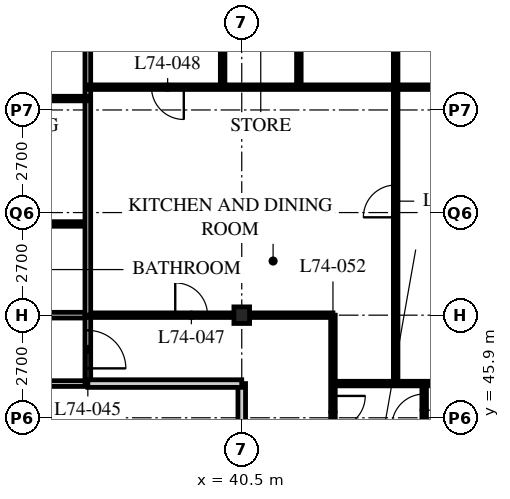
"""IFC4 building model, lengths in metres.
Left out: names, types, materials, properties, quantities, classifications, styles, units other than length and angle.
Written with IfcOpenShell. Run it as: python <this file> out.ifc"""

import sys

from ifc_helpers import new_model, si_unit, direction, frame, frame_2d, origin, origin_2d, place, context, subcontext, project, spatial, rectangle, i_section, extrude, element, fill, save


model = new_model("IFC4")
c1 = context("Model", 3, precision=1e-05, world=origin(), true_north=direction((0.0, 1.0)))
c2 = subcontext(c1, "Body", "Model", "MODEL_VIEW")
j1 = project(units=[si_unit("LENGTHUNIT", "METRE"), si_unit("PLANEANGLEUNIT", "RADIAN")], contexts=[c1])
p1 = place(None, origin())
s1 = spatial("IfcSite", under=j1, at=p1, CompositionType="ELEMENT")
p2 = place(p1, origin())
s2 = spatial("IfcBuilding", under=s1, at=p2, CompositionType="ELEMENT")
p3 = place(p2, frame((0.0, 0.0, 289.2)))
s3 = spatial("IfcBuildingStorey", under=s2, at=p3, CompositionType="ELEMENT", Elevation=289.2)
p4 = place(p3, frame((40.5, 48.6, 0.0), z_axis=(0.0, 0.0, 1.0), x_axis=(1.0, 0.0, 0.0)))
e1 = element("IfcColumn", 1, at=p4, inside=s3, PredefinedType="COLUMN", context=c2, shape_type="SweptSolid", body=[
    extrude(i_section(OverallWidth=0.412, OverallDepth=0.437, WebThickness=0.036, FlangeThickness=0.058, FilletRadius=0.015, at=origin_2d()), origin(), (0.0, 0.0, 1.0), 3.9),
])
p5 = place(p3, frame((12.15, 48.6, 0.0), z_axis=(0.0, 0.0, 1.0), x_axis=(1.0, 0.0, 0.0)))
e2 = element("IfcWall", 2, at=p5, inside=s3, PredefinedType="PARTITIONING", context=c2, shape_type="SweptSolid", body=[
    extrude(rectangle(XDim=24.3, YDim=0.15, at=frame_2d((12.15, 0.0))), origin(), (0.0, 0.0, 1.0), 3.078),
])
p6 = place(p5, frame((4.95, 0.0, 0.0)))
e3 = element("IfcOpeningElement", 3, at=p6, cuts=e2, PredefinedType="OPENING", context=c2, shape_type="SweptSolid", body=[
    extrude(rectangle(XDim=1.0, YDim=2.1, at=frame_2d((0.5, 1.05))), frame((0.0, 0.085, 0.0), z_axis=(0.0, -1.0, 0.0), x_axis=(1.0, 0.0, 0.0)), (0.0, 0.0, 1.0), 0.17),
])
p7 = place(p5, frame((16.6, 0.0, 0.0)))
e4 = element("IfcOpeningElement", 4, at=p7, cuts=e2, PredefinedType="OPENING", context=c2, shape_type="SweptSolid", body=[
    extrude(rectangle(XDim=1.0, YDim=2.1, at=frame_2d((0.5, 1.05))), frame((0.0, 0.085, 0.0), z_axis=(0.0, -1.0, 0.0), x_axis=(1.0, 0.0, 0.0)), (0.0, 0.0, 1.0), 0.17),
])
p8 = place(p5, frame((1.525, 0.0, 0.0)))
e5 = element("IfcOpeningElement", 5, at=p8, cuts=e2, PredefinedType="OPENING", context=c2, shape_type="SweptSolid", body=[
    extrude(rectangle(XDim=1.0, YDim=2.1, at=frame_2d((0.5, 1.05))), frame((0.0, 0.085, 0.0), z_axis=(0.0, -1.0, 0.0), x_axis=(1.0, 0.0, 0.0)), (0.0, 0.0, 1.0), 0.17),
])
p9 = place(p3, frame((29.56, 46.8, 0.0), z_axis=(0.0, 0.0, 1.0), x_axis=(1.0, 0.0, 0.0)))
e6 = element("IfcWall", 6, at=p9, inside=s3, PredefinedType="PARTITIONING", context=c2, shape_type="SweptSolid", body=[
    extrude(rectangle(XDim=6.89, YDim=0.15, at=frame_2d((3.445, 0.0))), origin(), (0.0, 0.0, 1.0), 3.69),
])
p10 = place(p9, frame((2.69, 0.0, 0.0)))
e7 = element("IfcOpeningElement", 7, at=p10, cuts=e6, PredefinedType="OPENING", context=c2, shape_type="SweptSolid", body=[
    extrude(rectangle(XDim=1.0, YDim=2.1, at=frame_2d((0.5, 1.05))), frame((0.0, 0.085, 0.0), z_axis=(0.0, -1.0, 0.0), x_axis=(1.0, 0.0, 0.0)), (0.0, 0.0, 1.0), 0.17),
])
p11 = place(p3, frame((36.45, 46.8, 0.0), z_axis=(0.0, 0.0, 1.0), x_axis=(0.0, 1.0, 0.0)))
e8 = element("IfcWall", 8, at=p11, inside=s3, PredefinedType="PARTITIONING", context=c2, shape_type="SweptSolid", body=[
    extrude(rectangle(XDim=1.8, YDim=0.15, at=frame_2d((0.9, 0.0))), origin(), (0.0, 0.0, 1.0), 3.69),
])
p12 = place(p11, frame((0.4, 0.0, 0.0)))
e9 = element("IfcOpeningElement", 9, at=p12, cuts=e8, PredefinedType="OPENING", context=c2, shape_type="SweptSolid", body=[
    extrude(rectangle(XDim=1.0, YDim=2.1, at=frame_2d((0.5, 1.05))), frame((0.0, 0.085, 0.0), z_axis=(0.0, -1.0, 0.0), x_axis=(1.0, 0.0, 0.0)), (0.0, 0.0, 1.0), 0.17),
])
p13 = place(p3, frame((40.5, 40.5, 0.0), z_axis=(0.0, 0.0, 1.0), x_axis=(0.0, 1.0, 0.0)))
e10 = element("IfcWall", 10, at=p13, inside=s3, PredefinedType="SOLIDWALL", context=c2, shape_type="SweptSolid", body=[
    extrude(rectangle(XDim=6.3, YDim=0.2, at=frame_2d((3.15, 0.0))), origin(), (0.0, 0.0, 1.0), 3.078),
])
p14 = place(p3, frame((8.15, 51.0, 0.0), z_axis=(0.0, 0.0, 1.0), x_axis=(1.0, 0.0, 0.0)))
e11 = element("IfcWall", 11, at=p14, inside=s3, PredefinedType="PARTITIONING", context=c2, shape_type="SweptSolid", body=[
    extrude(rectangle(XDim=28.3, YDim=0.12, at=frame_2d((14.15, 0.0))), origin(), (0.0, 0.0, 1.0), 3.69),
])
p15 = place(p14, frame((9.025, 0.0, 0.0)))
e12 = element("IfcOpeningElement", 12, at=p15, cuts=e11, PredefinedType="OPENING", context=c2, shape_type="SweptSolid", body=[
    extrude(rectangle(XDim=0.85, YDim=2.1, at=frame_2d((0.425, 1.05))), frame((0.0, 0.07, 0.0), z_axis=(0.0, -1.0, 0.0), x_axis=(1.0, 0.0, 0.0)), (0.0, 0.0, 1.0), 0.14),
])
p16 = place(p14, frame((16.475, 0.0, 0.0)))
e13 = element("IfcOpeningElement", 13, at=p16, cuts=e11, PredefinedType="OPENING", context=c2, shape_type="SweptSolid", body=[
    extrude(rectangle(XDim=0.85, YDim=2.1, at=frame_2d((0.425, 1.05))), frame((0.0, 0.07, 0.0), z_axis=(0.0, -1.0, 0.0), x_axis=(1.0, 0.0, 0.0)), (0.0, 0.0, 1.0), 0.14),
])
p17 = place(p14, frame((21.175, 0.0, 0.0)))
e14 = element("IfcOpeningElement", 14, at=p17, cuts=e11, PredefinedType="OPENING", context=c2, shape_type="SweptSolid", body=[
    extrude(rectangle(XDim=0.85, YDim=2.1, at=frame_2d((0.425, 1.05))), frame((0.0, 0.07, 0.0), z_axis=(0.0, -1.0, 0.0), x_axis=(1.0, 0.0, 0.0)), (0.0, 0.0, 1.0), 0.14),
])
p18 = place(p14, frame((24.575, 0.0, 0.0)))
e15 = element("IfcOpeningElement", 15, at=p18, cuts=e11, PredefinedType="OPENING", context=c2, shape_type="SweptSolid", body=[
    extrude(rectangle(XDim=0.85, YDim=2.1, at=frame_2d((0.425, 1.05))), frame((0.0, 0.07, 0.0), z_axis=(0.0, -1.0, 0.0), x_axis=(1.0, 0.0, 0.0)), (0.0, 0.0, 1.0), 0.14),
])
p19 = place(p14, frame((6.725, 0.0, 0.0)))
e16 = element("IfcOpeningElement", 16, at=p19, cuts=e11, PredefinedType="OPENING", context=c2, shape_type="SweptSolid", body=[
    extrude(rectangle(XDim=0.85, YDim=2.1, at=frame_2d((0.425, 1.05))), frame((0.0, 0.07, 0.0), z_axis=(0.0, -1.0, 0.0), x_axis=(1.0, 0.0, 0.0)), (0.0, 0.0, 1.0), 0.14),
])
p20 = place(p14, frame((2.875, 0.0, 0.0)))
e17 = element("IfcOpeningElement", 17, at=p20, cuts=e11, PredefinedType="OPENING", context=c2, shape_type="SweptSolid", body=[
    extrude(rectangle(XDim=0.85, YDim=2.1, at=frame_2d((0.425, 1.05))), frame((0.0, 0.07, 0.0), z_axis=(0.0, -1.0, 0.0), x_axis=(1.0, 0.0, 0.0)), (0.0, 0.0, 1.0), 0.14),
])
p21 = place(p3, frame((42.9, 48.6, 0.0), z_axis=(0.0, 0.0, 1.0), x_axis=(0.0, -1.0, 0.0)))
e18 = element("IfcWall", 18, at=p21, inside=s3, PredefinedType="PARTITIONING", context=c2, shape_type="SweptSolid", body=[
    extrude(rectangle(XDim=12.15, YDim=0.12, at=frame_2d((6.075, 0.0))), origin(), (0.0, 0.0, 1.0), 3.69),
])
p22 = place(p21, frame((2.125, 0.0, 0.0)))
e19 = element("IfcOpeningElement", 19, at=p22, cuts=e18, PredefinedType="OPENING", context=c2, shape_type="SweptSolid", body=[
    extrude(rectangle(XDim=0.85, YDim=2.1, at=frame_2d((0.425, 1.05))), frame((0.0, 0.07, 0.0), z_axis=(0.0, -1.0, 0.0), x_axis=(1.0, 0.0, 0.0)), (0.0, 0.0, 1.0), 0.14),
])
p23 = place(p21, frame((8.425, 0.0, 0.0)))
e20 = element("IfcOpeningElement", 20, at=p23, cuts=e18, PredefinedType="OPENING", context=c2, shape_type="SweptSolid", body=[
    extrude(rectangle(XDim=0.85, YDim=2.1, at=frame_2d((0.425, 1.05))), frame((0.0, 0.07, 0.0), z_axis=(0.0, -1.0, 0.0), x_axis=(1.0, 0.0, 0.0)), (0.0, 0.0, 1.0), 0.14),
])
p24 = place(p3, frame((36.45, 48.6, 0.0), z_axis=(0.0, 0.0, 1.0), x_axis=(1.0, 0.0, 0.0)))
e21 = element("IfcWall", 21, at=p24, inside=s3, PredefinedType="PARTITIONING", context=c2, shape_type="SweptSolid", body=[
    extrude(rectangle(XDim=6.45, YDim=0.12, at=frame_2d((3.225, 0.0))), origin(), (0.0, 0.0, 1.0), 3.078),
])
p25 = place(p24, frame((2.3, 0.0, 0.0)))
e22 = element("IfcOpeningElement", 22, at=p25, cuts=e21, PredefinedType="OPENING", context=c2, shape_type="SweptSolid", body=[
    extrude(rectangle(XDim=0.85, YDim=2.1, at=frame_2d((0.425, 1.05))), frame((0.0, 0.07, 0.0), z_axis=(0.0, -1.0, 0.0), x_axis=(1.0, 0.0, 0.0)), (0.0, 0.0, 1.0), 0.14),
])
p26 = place(p3, frame((36.45, 46.8, 0.0), z_axis=(0.0, 0.0, 1.0), x_axis=(1.0, 0.0, 0.0)))
e23 = element("IfcWall", 23, at=p26, inside=s3, PredefinedType="SOLIDWALL", context=c2, shape_type="SweptSolid", body=[
    extrude(rectangle(XDim=4.05, YDim=0.2, at=frame_2d((2.025, 0.0))), origin(), (0.0, 0.0, 1.0), 3.69),
])
p27 = place(p3, frame((42.9, 46.8, 0.0), z_axis=(0.0, 0.0, 1.0), x_axis=(1.0, 0.0, 0.0)))
e24 = element("IfcWall", 24, at=p27, inside=s3, PredefinedType="PARTITIONING", context=c2, shape_type="SweptSolid", body=[
    extrude(rectangle(XDim=13.5, YDim=0.12, at=frame_2d((6.75, 0.0))), origin(), (0.0, 0.0, 1.0), 3.69),
])
p28 = place(p3, frame((36.45, 64.5, 0.0), z_axis=(0.0, 0.0, 1.0), x_axis=(0.0, -1.0, 0.0)))
e25 = element("IfcWall", 25, at=p28, inside=s3, PredefinedType="PARTITIONING", context=c2, shape_type="SweptSolid", body=[
    extrude(rectangle(XDim=15.9, YDim=0.15, at=frame_2d((7.95, 0.0))), origin(), (0.0, 0.0, 1.0), 3.69),
])
p29 = place(p3, frame((36.45, 54.6, 0.0), z_axis=(0.0, 0.0, 1.0), x_axis=(1.0, 0.0, 0.0)))
e26 = element("IfcWall", 26, at=p29, inside=s3, PredefinedType="PARTITIONING", context=c2, shape_type="SweptSolid", body=[
    extrude(rectangle(XDim=19.95, YDim=0.12, at=frame_2d((9.975, 0.0))), origin(), (0.0, 0.0, 1.0), 3.69),
])
p30 = place(p29, frame((1.675, 0.0, 0.0)))
e27 = element("IfcOpeningElement", 27, at=p30, cuts=e26, PredefinedType="OPENING", context=c2, shape_type="SweptSolid", body=[
    extrude(rectangle(XDim=0.85, YDim=2.1, at=frame_2d((0.425, 1.05))), frame((0.0, 0.07, 0.0), z_axis=(0.0, -1.0, 0.0), x_axis=(1.0, 0.0, 0.0)), (0.0, 0.0, 1.0), 0.14),
])
p31 = place(p3, frame((44.55, 64.5, 0.0), z_axis=(0.0, 0.0, 1.0), x_axis=(0.0, -1.0, 0.0)))
e28 = element("IfcWall", 28, at=p31, inside=s3, PredefinedType="PARTITIONING", context=c2, shape_type="SweptSolid", body=[
    extrude(rectangle(XDim=17.7, YDim=0.12, at=frame_2d((8.85, 0.0))), origin(), (0.0, 0.0, 1.0), 3.69),
])
p32 = place(p31, frame((12.475, 0.0, 0.0)))
e29 = element("IfcOpeningElement", 29, at=p32, cuts=e28, PredefinedType="OPENING", context=c2, shape_type="SweptSolid", body=[
    extrude(rectangle(XDim=0.85, YDim=2.1, at=frame_2d((0.425, 1.05))), frame((0.0, 0.07, 0.0), z_axis=(0.0, -1.0, 0.0), x_axis=(1.0, 0.0, 0.0)), (0.0, 0.0, 1.0), 0.14),
])
p33 = place(p31, frame((4.525, 0.0, 0.0)))
e30 = element("IfcOpeningElement", 30, at=p33, cuts=e28, PredefinedType="OPENING", context=c2, shape_type="SweptSolid", body=[
    extrude(rectangle(XDim=0.85, YDim=2.1, at=frame_2d((0.425, 1.05))), frame((0.0, 0.07, 0.0), z_axis=(0.0, -1.0, 0.0), x_axis=(1.0, 0.0, 0.0)), (0.0, 0.0, 1.0), 0.14),
])
p34 = place(p3, frame((45.3, 46.8, 0.0), z_axis=(0.0, 0.0, 1.0), x_axis=(0.0, -1.0, 0.0)))
e31 = element("IfcWall", 31, at=p34, inside=s3, PredefinedType="PARTITIONING", context=c2, shape_type="SweptSolid", body=[
    extrude(rectangle(XDim=4.01, YDim=0.12, at=frame_2d((2.005, 0.0))), origin(), (0.0, 0.0, 1.0), 3.69),
])
p35 = place(p34, frame((0.275, 0.0, 0.0)))
e32 = element("IfcOpeningElement", 32, at=p35, cuts=e31, PredefinedType="OPENING", context=c2, shape_type="SweptSolid", body=[
    extrude(rectangle(XDim=0.85, YDim=2.1, at=frame_2d((0.425, 1.05))), frame((0.0, 0.07, 0.0), z_axis=(0.0, -1.0, 0.0), x_axis=(1.0, 0.0, 0.0)), (0.0, 0.0, 1.0), 0.14),
])
p36 = place(p3, frame((32.4, 54.3, 0.0), z_axis=(0.0, 0.0, 1.0), x_axis=(1.0, 0.0, 0.0)))
e33 = element("IfcWall", 33, at=p36, inside=s3, PredefinedType="PARTITIONING", context=c2, shape_type="SweptSolid", body=[
    extrude(rectangle(XDim=4.05, YDim=0.12, at=frame_2d((2.025, 0.0))), origin(), (0.0, 0.0, 1.0), 3.69),
])
p37 = place(p36, frame((1.6, 0.0, 0.0)))
e34 = element("IfcOpeningElement", 34, at=p37, cuts=e33, PredefinedType="OPENING", context=c2, shape_type="SweptSolid", body=[
    extrude(rectangle(XDim=0.85, YDim=2.1, at=frame_2d((0.425, 1.05))), frame((0.0, 0.07, 0.0), z_axis=(0.0, -1.0, 0.0), x_axis=(1.0, 0.0, 0.0)), (0.0, 0.0, 1.0), 0.14),
])
for number, where, z_axis, x_axis in (
    (35, (39.997, 54.6, 0.0), (0.0, 0.0, 1.0), (0.0, 1.0, 0.0)),
    (36, (42.003, 54.6, 0.0), (0.0, 0.0, 1.0), (0.0, 1.0, 0.0)),
):
    element("IfcWall", number, at=place(p3, frame(where, z_axis=z_axis, x_axis=x_axis)), inside=s3, PredefinedType="PARTITIONING", context=c2, shape_type="SweptSolid", body=[
        extrude(rectangle(XDim=2.363, YDim=0.12, at=frame_2d((1.181, 0.0))), origin(), (0.0, 0.0, 1.0), 3.69),
    ])
p38 = place(p12, origin())
e37 = element("IfcDoor", 37, at=p38, inside=s3, OperationType="SINGLE_SWING_RIGHT", PredefinedType="DOOR", context=c2, shape_type="SweptSolid", body=[
    extrude(rectangle(XDim=1.0, YDim=2.1, at=frame_2d((0.5, 1.05))), frame((0.0, 0.025, 0.0), z_axis=(0.0, -1.0, 0.0), x_axis=(1.0, 0.0, 0.0)), (0.0, 0.0, 1.0), 0.05),
])
fill(e9, e37)
p39 = place(p25, origin())
e38 = element("IfcDoor", 38, at=p39, inside=s3, OperationType="SINGLE_SWING_LEFT", PredefinedType="DOOR", context=c2, shape_type="SweptSolid", body=[
    extrude(rectangle(XDim=0.85, YDim=2.1, at=frame_2d((0.425, 1.05))), frame((0.0, 0.025, 0.0), z_axis=(0.0, -1.0, 0.0), x_axis=(1.0, 0.0, 0.0)), (0.0, 0.0, 1.0), 0.05),
])
fill(e22, e38)
p40 = place(p30, origin())
e39 = element("IfcDoor", 39, at=p40, inside=s3, OperationType="SINGLE_SWING_LEFT", PredefinedType="DOOR", context=c2, shape_type="SweptSolid", body=[
    extrude(rectangle(XDim=0.85, YDim=2.1, at=frame_2d((0.425, 1.05))), frame((0.0, 0.025, 0.0), z_axis=(0.0, -1.0, 0.0), x_axis=(1.0, 0.0, 0.0)), (0.0, 0.0, 1.0), 0.05),
])
fill(e27, e39)
p41 = place(p32, origin())
e40 = element("IfcDoor", 40, at=p41, inside=s3, OperationType="SINGLE_SWING_LEFT", PredefinedType="DOOR", context=c2, shape_type="SweptSolid", body=[
    extrude(rectangle(XDim=0.85, YDim=2.1, at=frame_2d((0.425, 1.05))), frame((0.0, 0.025, 0.0), z_axis=(0.0, -1.0, 0.0), x_axis=(1.0, 0.0, 0.0)), (0.0, 0.0, 1.0), 0.05),
])
fill(e29, e40)
p42 = place(p22, origin())
e41 = element("IfcDoor", 41, at=p42, inside=s3, OperationType="SINGLE_SWING_LEFT", PredefinedType="DOOR", context=c2, shape_type="SweptSolid", body=[
    extrude(rectangle(XDim=0.85, YDim=2.1, at=frame_2d((0.425, 1.05))), frame((0.0, 0.025, 0.0), z_axis=(0.0, -1.0, 0.0), x_axis=(1.0, 0.0, 0.0)), (0.0, 0.0, 1.0), 0.05),
])
fill(e19, e41)
p43 = place(p35, origin())
e42 = element("IfcDoor", 42, at=p43, inside=s3, OperationType="SINGLE_SWING_LEFT", PredefinedType="DOOR", context=c2, shape_type="SweptSolid", body=[
    extrude(rectangle(XDim=0.85, YDim=2.1, at=frame_2d((0.425, 1.05))), frame((0.0, 0.025, 0.0), z_axis=(0.0, -1.0, 0.0), x_axis=(1.0, 0.0, 0.0)), (0.0, 0.0, 1.0), 0.05),
])
fill(e32, e42)
save(model, sys.argv[1])
